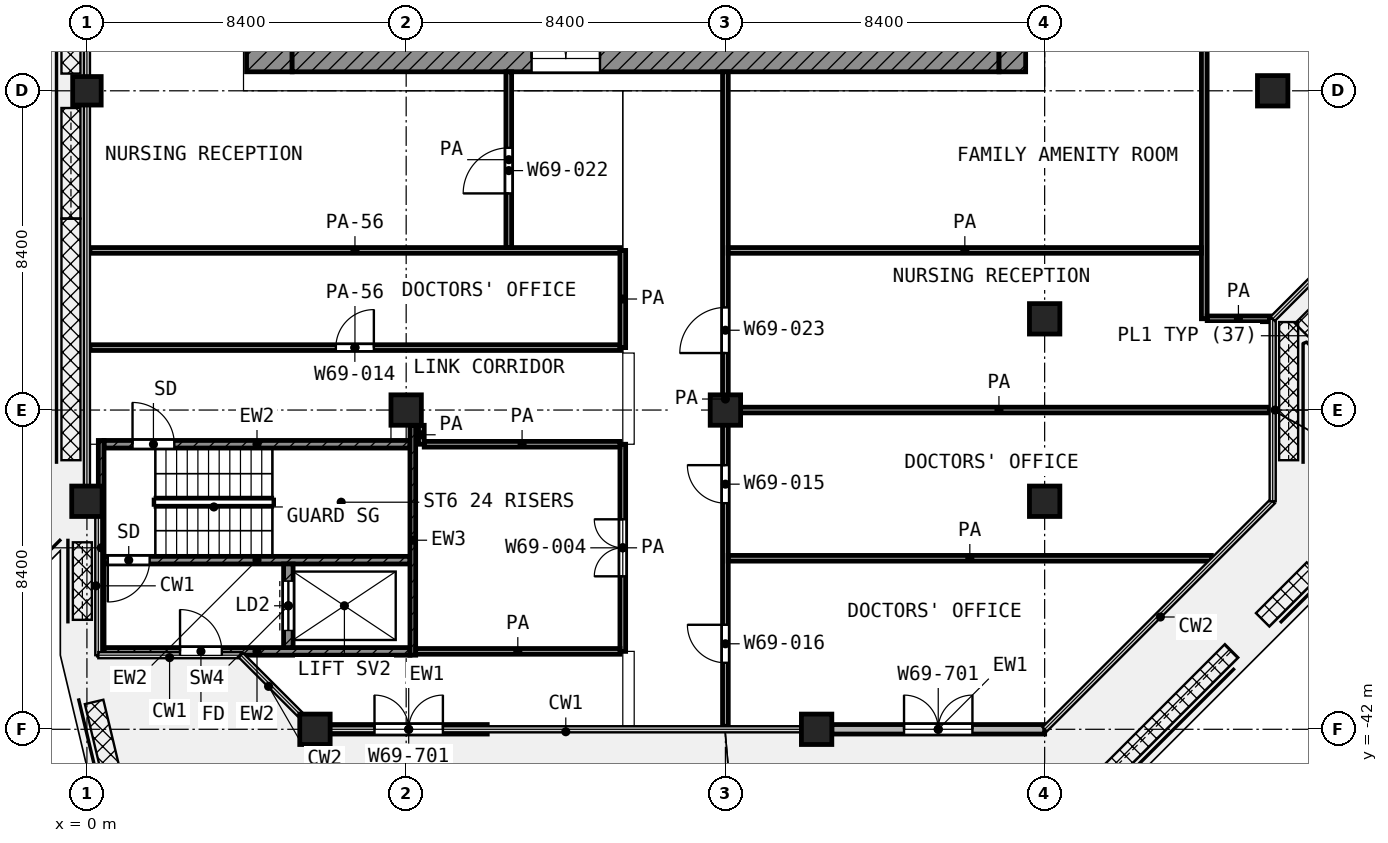
"""IFC4 building model, lengths in metres.
Left out: names, types, materials, properties, quantities, classifications, styles, units other than length and angle.
Written with IfcOpenShell. Run it as: python <this file> out.ifc"""

import sys

from ifc_helpers import new_model, si_unit, direction, frame, frame_2d, origin, origin_2d, place, context, subcontext, project, spatial, rectangle, extrude, element, fill, save


model = new_model("IFC4")
c1 = context("Model", 3, precision=1e-05, world=origin(), true_north=direction((0.0, 1.0)))
c2 = subcontext(c1, "Body", "Model", "MODEL_VIEW")
j1 = project(units=[si_unit("LENGTHUNIT", "METRE"), si_unit("PLANEANGLEUNIT", "RADIAN")], contexts=[c1])
p1 = place(None, origin())
s1 = spatial("IfcSite", under=j1, at=p1, CompositionType="ELEMENT")
p2 = place(p1, origin())
s2 = spatial("IfcBuilding", under=s1, at=p2, CompositionType="ELEMENT")
p3 = place(p2, frame((0.0, 0.0, 298.6)))
s3 = spatial("IfcBuildingStorey", under=s2, at=p3, CompositionType="ELEMENT", Elevation=298.6)
p4 = place(p3, frame((0.0, -25.2, 0.0), z_axis=(0.0, 0.0, 1.0), x_axis=(1.0, 0.0, 0.0)))
e1 = element("IfcColumn", 1, at=p4, inside=s3, PredefinedType="COLUMN", context=c2, shape_type="SweptSolid", body=[
    extrude(rectangle(XDim=0.75, YDim=0.75, at=origin_2d()), origin(), (0.0, 0.0, 1.0), 4.2),
])
for number, where, z_axis, x_axis in (
    (2, (31.2, -25.2, 0.0), (0.0, 0.0, 1.0), (1.0, 0.0, 0.0)),
    (3, (25.2, -31.2, 0.0), (0.0, 0.0, 1.0), (1.0, 0.0, 0.0)),
    (4, (8.4, -33.6, 0.0), (0.0, 0.0, 1.0), (1.0, 0.0, 0.0)),
    (5, (16.8, -33.6, 0.0), (0.0, 0.0, 1.0), (1.0, 0.0, 0.0)),
    (6, (0.0, -36.0, 0.0), (0.0, 0.0, 1.0), (1.0, 0.0, 0.0)),
    (7, (25.2, -36.0, 0.0), (0.0, 0.0, 1.0), (1.0, 0.0, 0.0)),
    (8, (6.0, -42.0, 0.0), (0.0, 0.0, 1.0), (1.0, 0.0, 0.0)),
    (9, (19.2, -42.0, 0.0), (0.0, 0.0, 1.0), (1.0, 0.0, 0.0)),
):
    element("IfcColumn", number, at=place(p3, frame(where, z_axis=z_axis, x_axis=x_axis)), inside=s3, PredefinedType="COLUMN", context=c2, shape_type="SweptSolid", body=[
        extrude(rectangle(XDim=0.8, YDim=0.8, at=origin_2d()), origin(), (0.0, 0.0, 1.0), 4.2),
    ])
p5 = place(p3, frame((6.4, -42.0, 0.0), z_axis=(0.0, 0.0, 1.0), x_axis=(1.0, 0.0, 0.0)))
e10 = element("IfcWall", 10, at=p5, inside=s3, PredefinedType="SOLIDWALL", context=c2, shape_type="SweptSolid", body=[
    extrude(rectangle(XDim=4.134, YDim=0.25, at=frame_2d((2.067, 0.0))), origin(), (0.0, 0.0, 1.0), 3.48),
])
p6 = place(p5, frame((1.167, 0.0, 0.0)))
e11 = element("IfcOpeningElement", 11, at=p6, cuts=e10, PredefinedType="OPENING", context=c2, shape_type="SweptSolid", body=[
    extrude(rectangle(XDim=1.8, YDim=2.1, at=frame_2d((0.9, 1.05))), frame((0.0, 0.135, 0.0), z_axis=(0.0, -1.0, 0.0), x_axis=(1.0, 0.0, 0.0)), (0.0, 0.0, 1.0), 0.27),
])
p7 = place(p3, frame((19.6, -42.0, 0.0), z_axis=(0.0, 0.0, 1.0), x_axis=(1.0, 0.0, 0.0)))
e12 = element("IfcWall", 12, at=p7, inside=s3, PredefinedType="SOLIDWALL", context=c2, shape_type="SweptSolid", body=[
    extrude(rectangle(XDim=5.6, YDim=0.25, at=frame_2d((2.8, 0.0))), origin(), (0.0, 0.0, 1.0), 3.48),
])
p8 = place(p7, frame((1.9, 0.0, 0.0)))
e13 = element("IfcOpeningElement", 13, at=p8, cuts=e12, PredefinedType="OPENING", context=c2, shape_type="SweptSolid", body=[
    extrude(rectangle(XDim=1.8, YDim=2.1, at=frame_2d((0.9, 1.05))), frame((0.0, 0.135, 0.0), z_axis=(0.0, -1.0, 0.0), x_axis=(1.0, 0.0, 0.0)), (0.0, 0.0, 1.0), 0.27),
])
p9 = place(p3, frame((4.8, -24.7, 0.0), z_axis=(0.0, 0.0, 1.0), x_axis=(0.0, 1.0, 0.0)))
e14 = element("IfcWall", 14, at=p9, inside=s3, PredefinedType="SHEAR", context=c2, shape_type="SweptSolid", body=[
    extrude(rectangle(XDim=19.3, YDim=1.2, at=frame_2d((9.65, 0.0))), origin(), (0.0, 0.0, 1.0), 3.6),
])
p10 = place(p9, frame((11.15, 0.0, 0.0)))
e15 = element("IfcOpeningElement", 15, at=p10, cuts=e14, PredefinedType="OPENING", context=c2, shape_type="SweptSolid", body=[
    extrude(rectangle(XDim=1.1, YDim=2.1, at=frame_2d((0.55, 1.05))), frame((0.0, 0.61, 0.0), z_axis=(0.0, -1.0, 0.0), x_axis=(1.0, 0.0, 0.0)), (0.0, 0.0, 1.0), 1.22),
])
p11 = place(p9, frame((1.85, 0.0, 0.0)))
e16 = element("IfcOpeningElement", 16, at=p11, cuts=e14, PredefinedType="OPENING", context=c2, shape_type="SweptSolid", body=[
    extrude(rectangle(XDim=1.1, YDim=2.1, at=frame_2d((0.55, 1.05))), frame((0.0, 0.61, 0.0), z_axis=(0.0, -1.0, 0.0), x_axis=(1.0, 0.0, 0.0)), (0.0, 0.0, 1.0), 1.22),
])
p12 = place(p3, frame((5.4, -24.35, 0.0), z_axis=(0.0, 0.0, 1.0), x_axis=(1.0, 0.0, 0.0)))
e17 = element("IfcWall", 17, at=p12, inside=s3, PredefinedType="SHEAR", context=c2, shape_type="SweptSolid", body=[
    extrude(rectangle(XDim=18.6, YDim=0.7, at=frame_2d((9.3, 0.0))), origin(), (0.0, 0.0, 1.0), 3.6),
])
p13 = place(p12, frame((6.3, 0.0, 0.0)))
e18 = element("IfcOpeningElement", 18, at=p13, cuts=e17, PredefinedType="OPENING", context=c2, shape_type="SweptSolid", body=[
    extrude(rectangle(XDim=1.8, YDim=2.1, at=frame_2d((0.9, 1.05))), frame((0.0, 0.36, 0.0), z_axis=(0.0, -1.0, 0.0), x_axis=(1.0, 0.0, 0.0)), (0.0, 0.0, 1.0), 0.72),
])
p14 = place(p3, frame((24.35, -24.7, 0.0), z_axis=(0.0, 0.0, 1.0), x_axis=(0.0, 1.0, 0.0)))
e19 = element("IfcWall", 19, at=p14, inside=s3, PredefinedType="SHEAR", context=c2, shape_type="SweptSolid", body=[
    extrude(rectangle(XDim=0.7, YDim=0.7, at=frame_2d((0.35, 0.0))), origin(), (0.0, 0.0, 1.0), 3.6),
])
p15 = place(p3, frame((0.375, -40.05, 0.0), z_axis=(0.0, 0.0, 1.0), x_axis=(0.0, 1.0, 0.0)))
e20 = element("IfcWall", 20, at=p15, inside=s3, PredefinedType="SHEAR", context=c2, shape_type="SweptSolid", body=[
    extrude(rectangle(XDim=5.65, YDim=0.15, at=frame_2d((2.825, 0.0))), origin(), (0.0, 0.0, 1.0), 3.6),
])
p16 = place(p3, frame((8.575, -40.05, 0.0), z_axis=(0.0, 0.0, 1.0), x_axis=(0.0, 1.0, 0.0)))
e21 = element("IfcWall", 21, at=p16, inside=s3, PredefinedType="SHEAR", context=c2, shape_type="SweptSolid", body=[
    extrude(rectangle(XDim=6.05, YDim=0.15, at=frame_2d((3.025, 0.0))), origin(), (0.0, 0.0, 1.0), 3.6),
])
p17 = place(p3, frame((0.45, -34.5, 0.0), z_axis=(0.0, 0.0, 1.0), x_axis=(1.0, 0.0, 0.0)))
e22 = element("IfcWall", 22, at=p17, inside=s3, PredefinedType="SHEAR", context=c2, shape_type="SweptSolid", body=[
    extrude(rectangle(XDim=8.05, YDim=0.2, at=frame_2d((4.025, 0.0))), origin(), (0.0, 0.0, 1.0), 3.6),
])
p18 = place(p17, frame((0.75, 0.0, 0.0)))
e23 = element("IfcOpeningElement", 23, at=p18, cuts=e22, PredefinedType="OPENING", context=c2, shape_type="SweptSolid", body=[
    extrude(rectangle(XDim=1.1, YDim=2.1, at=frame_2d((0.55, 1.05))), frame((0.0, 0.11, 0.0), z_axis=(0.0, -1.0, 0.0), x_axis=(1.0, 0.0, 0.0)), (0.0, 0.0, 1.0), 0.22),
])
p19 = place(p3, frame((0.45, -37.55, 0.0), z_axis=(0.0, 0.0, 1.0), x_axis=(1.0, 0.0, 0.0)))
e24 = element("IfcWall", 24, at=p19, inside=s3, PredefinedType="SHEAR", context=c2, shape_type="SweptSolid", body=[
    extrude(rectangle(XDim=8.05, YDim=0.2, at=frame_2d((4.025, 0.0))), origin(), (0.0, 0.0, 1.0), 3.6),
])
p20 = place(p19, frame((0.1, 0.0, 0.0)))
e25 = element("IfcOpeningElement", 25, at=p20, cuts=e24, PredefinedType="OPENING", context=c2, shape_type="SweptSolid", body=[
    extrude(rectangle(XDim=1.1, YDim=2.1, at=frame_2d((0.55, 1.05))), frame((0.0, 0.11, 0.0), z_axis=(0.0, -1.0, 0.0), x_axis=(1.0, 0.0, 0.0)), (0.0, 0.0, 1.0), 0.22),
])
p21 = place(p3, frame((0.45, -39.95, 0.0), z_axis=(0.0, 0.0, 1.0), x_axis=(1.0, 0.0, 0.0)))
e26 = element("IfcWall", 26, at=p21, inside=s3, PredefinedType="SHEAR", context=c2, shape_type="SweptSolid", body=[
    extrude(rectangle(XDim=8.05, YDim=0.2, at=frame_2d((4.025, 0.0))), origin(), (0.0, 0.0, 1.0), 3.6),
])
p22 = place(p21, frame((2.0, 0.0, 0.0)))
e27 = element("IfcOpeningElement", 27, at=p22, cuts=e26, PredefinedType="OPENING", context=c2, shape_type="SweptSolid", body=[
    extrude(rectangle(XDim=1.1, YDim=2.1, at=frame_2d((0.55, 1.05))), frame((0.0, 0.11, 0.0), z_axis=(0.0, -1.0, 0.0), x_axis=(1.0, 0.0, 0.0)), (0.0, 0.0, 1.0), 0.22),
])
p23 = place(p3, frame((5.3, -39.85, 0.0), z_axis=(0.0, 0.0, 1.0), x_axis=(0.0, 1.0, 0.0)))
e28 = element("IfcWall", 28, at=p23, inside=s3, PredefinedType="SHEAR", context=c2, shape_type="SweptSolid", body=[
    extrude(rectangle(XDim=2.2, YDim=0.25, at=frame_2d((1.1, 0.0))), origin(), (0.0, 0.0, 1.0), 3.6),
])
p24 = place(p23, frame((0.45, 0.0, 0.0)))
e29 = element("IfcOpeningElement", 29, at=p24, cuts=e28, PredefinedType="OPENING", context=c2, shape_type="SweptSolid", body=[
    extrude(rectangle(XDim=1.3, YDim=2.1, at=frame_2d((0.65, 1.05))), frame((0.0, 0.135, 0.0), z_axis=(0.0, -1.0, 0.0), x_axis=(1.0, 0.0, 0.0)), (0.0, 0.0, 1.0), 0.27),
])
p25 = place(p3, frame((8.65, -39.95, 0.0), z_axis=(0.0, 0.0, 1.0), x_axis=(1.0, 0.0, 0.0)))
e30 = element("IfcWall", 30, at=p25, inside=s3, PredefinedType="PARTITIONING", context=c2, shape_type="SweptSolid", body=[
    extrude(rectangle(XDim=5.375, YDim=0.15, at=frame_2d((2.688, 0.0))), origin(), (0.0, 0.0, 1.0), 3.6),
])
p26 = place(p3, frame((16.875, -37.5, 0.0), z_axis=(0.0, 0.0, 1.0), x_axis=(1.0, 0.0, 0.0)))
e31 = element("IfcWall", 31, at=p26, inside=s3, PredefinedType="PARTITIONING", context=c2, shape_type="SweptSolid", body=[
    extrude(rectangle(XDim=12.712, YDim=0.15, at=frame_2d((6.356, 0.0))), origin(), (0.0, 0.0, 1.0), 3.6),
])
p27 = place(p3, frame((8.875, -34.5, 0.0), z_axis=(0.0, 0.0, 1.0), x_axis=(1.0, 0.0, 0.0)))
e32 = element("IfcWall", 32, at=p27, inside=s3, PredefinedType="PARTITIONING", context=c2, shape_type="SweptSolid", body=[
    extrude(rectangle(XDim=5.15, YDim=0.15, at=frame_2d((2.575, 0.0))), origin(), (0.0, 0.0, 1.0), 3.6),
])
p28 = place(p3, frame((16.875, -33.6, 0.0), z_axis=(0.0, 0.0, 1.0), x_axis=(1.0, 0.0, 0.0)))
e33 = element("IfcWall", 33, at=p28, inside=s3, PredefinedType="PARTITIONING", context=c2, shape_type="SweptSolid", body=[
    extrude(rectangle(XDim=14.245, YDim=0.15, at=frame_2d((7.123, 0.0))), origin(), (0.0, 0.0, 1.0), 3.6),
])
p29 = place(p3, frame((0.08, -31.957, 0.0), z_axis=(0.0, 0.0, 1.0), x_axis=(1.0, 0.0, 0.0)))
e34 = element("IfcWall", 34, at=p29, inside=s3, PredefinedType="PARTITIONING", context=c2, shape_type="SweptSolid", body=[
    extrude(rectangle(XDim=13.945, YDim=0.15, at=frame_2d((6.972, 0.0))), origin(), (0.0, 0.0, 1.0), 2.7),
])
p30 = place(p29, frame((6.47, 0.0, 0.0)))
e35 = element("IfcOpeningElement", 35, at=p30, cuts=e34, PredefinedType="OPENING", context=c2, shape_type="SweptSolid", body=[
    extrude(rectangle(XDim=1.0, YDim=2.1, at=frame_2d((0.5, 1.05))), frame((0.0, 0.085, 0.0), z_axis=(0.0, -1.0, 0.0), x_axis=(1.0, 0.0, 0.0)), (0.0, 0.0, 1.0), 0.17),
])
p31 = place(p3, frame((29.477, -31.2, 0.0), z_axis=(0.0, 0.0, 1.0), x_axis=(1.0, 0.0, 0.0)))
e36 = element("IfcWall", 36, at=p31, inside=s3, PredefinedType="PARTITIONING", context=c2, shape_type="SweptSolid", body=[
    extrude(rectangle(XDim=1.643, YDim=0.15, at=frame_2d((0.822, 0.0))), origin(), (0.0, 0.0, 1.0), 3.6),
])
p32 = place(p3, frame((0.08, -29.4, 0.0), z_axis=(0.0, 0.0, 1.0), x_axis=(1.0, 0.0, 0.0)))
e37 = element("IfcWall", 37, at=p32, inside=s3, PredefinedType="PARTITIONING", context=c2, shape_type="SweptSolid", body=[
    extrude(rectangle(XDim=13.945, YDim=0.15, at=frame_2d((6.972, 0.0))), origin(), (0.0, 0.0, 1.0), 2.7),
])
p33 = place(p3, frame((16.875, -29.4, 0.0), z_axis=(0.0, 0.0, 1.0), x_axis=(1.0, 0.0, 0.0)))
e38 = element("IfcWall", 38, at=p33, inside=s3, PredefinedType="PARTITIONING", context=c2, shape_type="SweptSolid", body=[
    extrude(rectangle(XDim=12.45, YDim=0.15, at=frame_2d((6.225, 0.0))), origin(), (0.0, 0.0, 1.0), 3.6),
])
p34 = place(p3, frame((8.8, -34.5, 0.0), z_axis=(0.0, 0.0, 1.0), x_axis=(0.0, 1.0, 0.0)))
e39 = element("IfcWall", 39, at=p34, inside=s3, PredefinedType="PARTITIONING", context=c2, shape_type="SweptSolid", body=[
    extrude(rectangle(XDim=0.499, YDim=0.15, at=frame_2d((0.25, 0.0))), origin(), (0.0, 0.0, 1.0), 3.6),
])
p35 = place(p3, frame((11.1, -29.325, 0.0), z_axis=(0.0, 0.0, 1.0), x_axis=(0.0, 1.0, 0.0)))
e40 = element("IfcWall", 40, at=p35, inside=s3, PredefinedType="PARTITIONING", context=c2, shape_type="SweptSolid", body=[
    extrude(rectangle(XDim=4.625, YDim=0.15, at=frame_2d((2.312, 0.0))), origin(), (0.0, 0.0, 1.0), 3.6),
])
p36 = place(p35, frame((1.425, 0.0, 0.0)))
e41 = element("IfcOpeningElement", 41, at=p36, cuts=e40, PredefinedType="OPENING", context=c2, shape_type="SweptSolid", body=[
    extrude(rectangle(XDim=1.2, YDim=2.1, at=frame_2d((0.6, 1.05))), frame((0.0, 0.085, 0.0), z_axis=(0.0, -1.0, 0.0), x_axis=(1.0, 0.0, 0.0)), (0.0, 0.0, 1.0), 0.17),
])
p37 = place(p3, frame((14.1, -39.95, 0.0), z_axis=(0.0, 0.0, 1.0), x_axis=(0.0, 1.0, 0.0)))
e42 = element("IfcWall", 42, at=p37, inside=s3, PredefinedType="PARTITIONING", context=c2, shape_type="SweptSolid", body=[
    extrude(rectangle(XDim=5.45, YDim=0.15, at=frame_2d((2.725, 0.0))), origin(), (0.0, 0.0, 1.0), 3.6),
])
p38 = place(p37, frame((1.975, 0.0, 0.0)))
e43 = element("IfcOpeningElement", 43, at=p38, cuts=e42, PredefinedType="OPENING", context=c2, shape_type="SweptSolid", body=[
    extrude(rectangle(XDim=1.5, YDim=2.1, at=frame_2d((0.75, 1.05))), frame((0.0, 0.085, 0.0), z_axis=(0.0, -1.0, 0.0), x_axis=(1.0, 0.0, 0.0)), (0.0, 0.0, 1.0), 0.17),
])
p39 = place(p3, frame((14.1, -31.957, 0.0), z_axis=(0.0, 0.0, 1.0), x_axis=(0.0, 1.0, 0.0)))
e44 = element("IfcWall", 44, at=p39, inside=s3, PredefinedType="PARTITIONING", context=c2, shape_type="SweptSolid", body=[
    extrude(rectangle(XDim=2.557, YDim=0.15, at=frame_2d((1.279, 0.0))), origin(), (0.0, 0.0, 1.0), 3.6),
])
p40 = place(p3, frame((16.8, -41.92, 0.0), z_axis=(0.0, 0.0, 1.0), x_axis=(0.0, 1.0, 0.0)))
e45 = element("IfcWall", 45, at=p40, inside=s3, PredefinedType="PARTITIONING", context=c2, shape_type="SweptSolid", body=[
    extrude(rectangle(XDim=17.22, YDim=0.15, at=frame_2d((8.61, 0.0))), origin(), (0.0, 0.0, 1.0), 3.6),
])
p41 = place(p40, frame((9.82, 0.0, 0.0)))
e46 = element("IfcOpeningElement", 46, at=p41, cuts=e45, PredefinedType="OPENING", context=c2, shape_type="SweptSolid", body=[
    extrude(rectangle(XDim=1.2, YDim=2.1, at=frame_2d((0.6, 1.05))), frame((0.0, 0.085, 0.0), z_axis=(0.0, -1.0, 0.0), x_axis=(1.0, 0.0, 0.0)), (0.0, 0.0, 1.0), 0.17),
])
p42 = place(p40, frame((5.87, 0.0, 0.0)))
e47 = element("IfcOpeningElement", 47, at=p42, cuts=e45, PredefinedType="OPENING", context=c2, shape_type="SweptSolid", body=[
    extrude(rectangle(XDim=1.0, YDim=2.1, at=frame_2d((0.5, 1.05))), frame((0.0, 0.085, 0.0), z_axis=(0.0, -1.0, 0.0), x_axis=(1.0, 0.0, 0.0)), (0.0, 0.0, 1.0), 0.17),
])
p43 = place(p40, frame((1.67, 0.0, 0.0)))
e48 = element("IfcOpeningElement", 48, at=p43, cuts=e45, PredefinedType="OPENING", context=c2, shape_type="SweptSolid", body=[
    extrude(rectangle(XDim=1.0, YDim=2.1, at=frame_2d((0.5, 1.05))), frame((0.0, 0.085, 0.0), z_axis=(0.0, -1.0, 0.0), x_axis=(1.0, 0.0, 0.0)), (0.0, 0.0, 1.0), 0.17),
])
p44 = place(p3, frame((29.4, -31.198, 0.0), z_axis=(0.0, 0.0, 1.0), x_axis=(0.0, 1.0, 0.0)))
e49 = element("IfcWall", 49, at=p44, inside=s3, PredefinedType="PARTITIONING", context=c2, shape_type="SweptSolid", body=[
    extrude(rectangle(XDim=14.323, YDim=0.15, at=frame_2d((7.162, 0.0))), origin(), (0.0, 0.0, 1.0), 3.6),
])
p45 = place(p6, origin())
e50 = element("IfcDoor", 50, at=p45, inside=s3, OperationType="DOUBLE_DOOR_SINGLE_SWING", PredefinedType="DOOR", context=c2, shape_type="SweptSolid", body=[
    extrude(rectangle(XDim=1.8, YDim=2.1, at=frame_2d((0.9, 1.05))), frame((0.0, 0.025, 0.0), z_axis=(0.0, -1.0, 0.0), x_axis=(1.0, 0.0, 0.0)), (0.0, 0.0, 1.0), 0.05),
])
fill(e11, e50)
p46 = place(p8, origin())
e51 = element("IfcDoor", 51, at=p46, inside=s3, OperationType="DOUBLE_DOOR_SINGLE_SWING", PredefinedType="DOOR", context=c2, shape_type="SweptSolid", body=[
    extrude(rectangle(XDim=1.8, YDim=2.1, at=frame_2d((0.9, 1.05))), frame((0.0, 0.025, 0.0), z_axis=(0.0, -1.0, 0.0), x_axis=(1.0, 0.0, 0.0)), (0.0, 0.0, 1.0), 0.05),
])
fill(e13, e51)
p47 = place(p13, origin())
e52 = element("IfcDoor", 52, at=p47, inside=s3, OperationType="DOUBLE_DOOR_SINGLE_SWING", PredefinedType="DOOR", context=c2, shape_type="SweptSolid", body=[
    extrude(rectangle(XDim=1.8, YDim=2.1, at=frame_2d((0.9, 1.05))), frame((0.0, 0.025, 0.0), z_axis=(0.0, -1.0, 0.0), x_axis=(1.0, 0.0, 0.0)), (0.0, 0.0, 1.0), 0.05),
])
fill(e18, e52)
p48 = place(p18, origin())
e53 = element("IfcDoor", 53, at=p48, inside=s3, OperationType="SINGLE_SWING_LEFT", PredefinedType="DOOR", context=c2, shape_type="SweptSolid", body=[
    extrude(rectangle(XDim=1.1, YDim=2.1, at=frame_2d((0.55, 1.05))), frame((0.0, 0.025, 0.0), z_axis=(0.0, -1.0, 0.0), x_axis=(1.0, 0.0, 0.0)), (0.0, 0.0, 1.0), 0.05),
])
fill(e23, e53)
p49 = place(p20, frame((1.1, 0.0, 0.0), z_axis=(0.0, 0.0, 1.0), x_axis=(-1.0, 0.0, 0.0)))
e54 = element("IfcDoor", 54, at=p49, inside=s3, OperationType="SINGLE_SWING_LEFT", PredefinedType="DOOR", context=c2, shape_type="SweptSolid", body=[
    extrude(rectangle(XDim=1.1, YDim=2.1, at=frame_2d((0.55, 1.05))), frame((0.0, 0.025, 0.0), z_axis=(0.0, -1.0, 0.0), x_axis=(1.0, 0.0, 0.0)), (0.0, 0.0, 1.0), 0.05),
])
fill(e25, e54)
p50 = place(p24, origin())
e55 = element("IfcDoor", 55, at=p50, inside=s3, OperationType="DOUBLE_DOOR_SLIDING", PredefinedType="DOOR", context=c2, shape_type="SweptSolid", body=[
    extrude(rectangle(XDim=1.3, YDim=2.1, at=frame_2d((0.65, 1.05))), frame((0.0, 0.025, 0.0), z_axis=(0.0, -1.0, 0.0), x_axis=(1.0, 0.0, 0.0)), (0.0, 0.0, 1.0), 0.05),
])
fill(e29, e55)
p51 = place(p22, origin())
e56 = element("IfcDoor", 56, at=p51, inside=s3, OperationType="SINGLE_SWING_LEFT", PredefinedType="DOOR", context=c2, shape_type="SweptSolid", body=[
    extrude(rectangle(XDim=1.1, YDim=2.1, at=frame_2d((0.55, 1.05))), frame((0.0, 0.025, 0.0), z_axis=(0.0, -1.0, 0.0), x_axis=(1.0, 0.0, 0.0)), (0.0, 0.0, 1.0), 0.05),
])
fill(e27, e56)
p52 = place(p36, origin())
e57 = element("IfcDoor", 57, at=p52, inside=s3, OperationType="SINGLE_SWING_LEFT", PredefinedType="DOOR", context=c2, shape_type="SweptSolid", body=[
    extrude(rectangle(XDim=1.2, YDim=2.1, at=frame_2d((0.6, 1.05))), frame((0.0, 0.025, 0.0), z_axis=(0.0, -1.0, 0.0), x_axis=(1.0, 0.0, 0.0)), (0.0, 0.0, 1.0), 0.05),
])
fill(e41, e57)
p53 = place(p30, origin())
e58 = element("IfcDoor", 58, at=p53, inside=s3, OperationType="SINGLE_SWING_RIGHT", PredefinedType="DOOR", context=c2, shape_type="SweptSolid", body=[
    extrude(rectangle(XDim=1.0, YDim=2.1, at=frame_2d((0.5, 1.05))), frame((0.0, 0.025, 0.0), z_axis=(0.0, -1.0, 0.0), x_axis=(1.0, 0.0, 0.0)), (0.0, 0.0, 1.0), 0.05),
])
fill(e35, e58)
p54 = place(p38, origin())
e59 = element("IfcDoor", 59, at=p54, inside=s3, OperationType="DOUBLE_DOOR_SINGLE_SWING", PredefinedType="DOOR", context=c2, shape_type="SweptSolid", body=[
    extrude(rectangle(XDim=1.5, YDim=2.1, at=frame_2d((0.75, 1.05))), frame((0.0, 0.025, 0.0), z_axis=(0.0, -1.0, 0.0), x_axis=(1.0, 0.0, 0.0)), (0.0, 0.0, 1.0), 0.05),
])
fill(e43, e59)
p55 = place(p41, origin())
e60 = element("IfcDoor", 60, at=p55, inside=s3, OperationType="SINGLE_SWING_LEFT", PredefinedType="DOOR", context=c2, shape_type="SweptSolid", body=[
    extrude(rectangle(XDim=1.2, YDim=2.1, at=frame_2d((0.6, 1.05))), frame((0.0, 0.025, 0.0), z_axis=(0.0, -1.0, 0.0), x_axis=(1.0, 0.0, 0.0)), (0.0, 0.0, 1.0), 0.05),
])
fill(e46, e60)
p56 = place(p42, origin())
e61 = element("IfcDoor", 61, at=p56, inside=s3, OperationType="SINGLE_SWING_RIGHT", PredefinedType="DOOR", context=c2, shape_type="SweptSolid", body=[
    extrude(rectangle(XDim=1.0, YDim=2.1, at=frame_2d((0.5, 1.05))), frame((0.0, 0.025, 0.0), z_axis=(0.0, -1.0, 0.0), x_axis=(1.0, 0.0, 0.0)), (0.0, 0.0, 1.0), 0.05),
])
fill(e47, e61)
p57 = place(p43, origin())
e62 = element("IfcDoor", 62, at=p57, inside=s3, OperationType="SINGLE_SWING_RIGHT", PredefinedType="DOOR", context=c2, shape_type="SweptSolid", body=[
    extrude(rectangle(XDim=1.0, YDim=2.1, at=frame_2d((0.5, 1.05))), frame((0.0, 0.025, 0.0), z_axis=(0.0, -1.0, 0.0), x_axis=(1.0, 0.0, 0.0)), (0.0, 0.0, 1.0), 0.05),
])
fill(e48, e62)
save(model, sys.argv[1])
